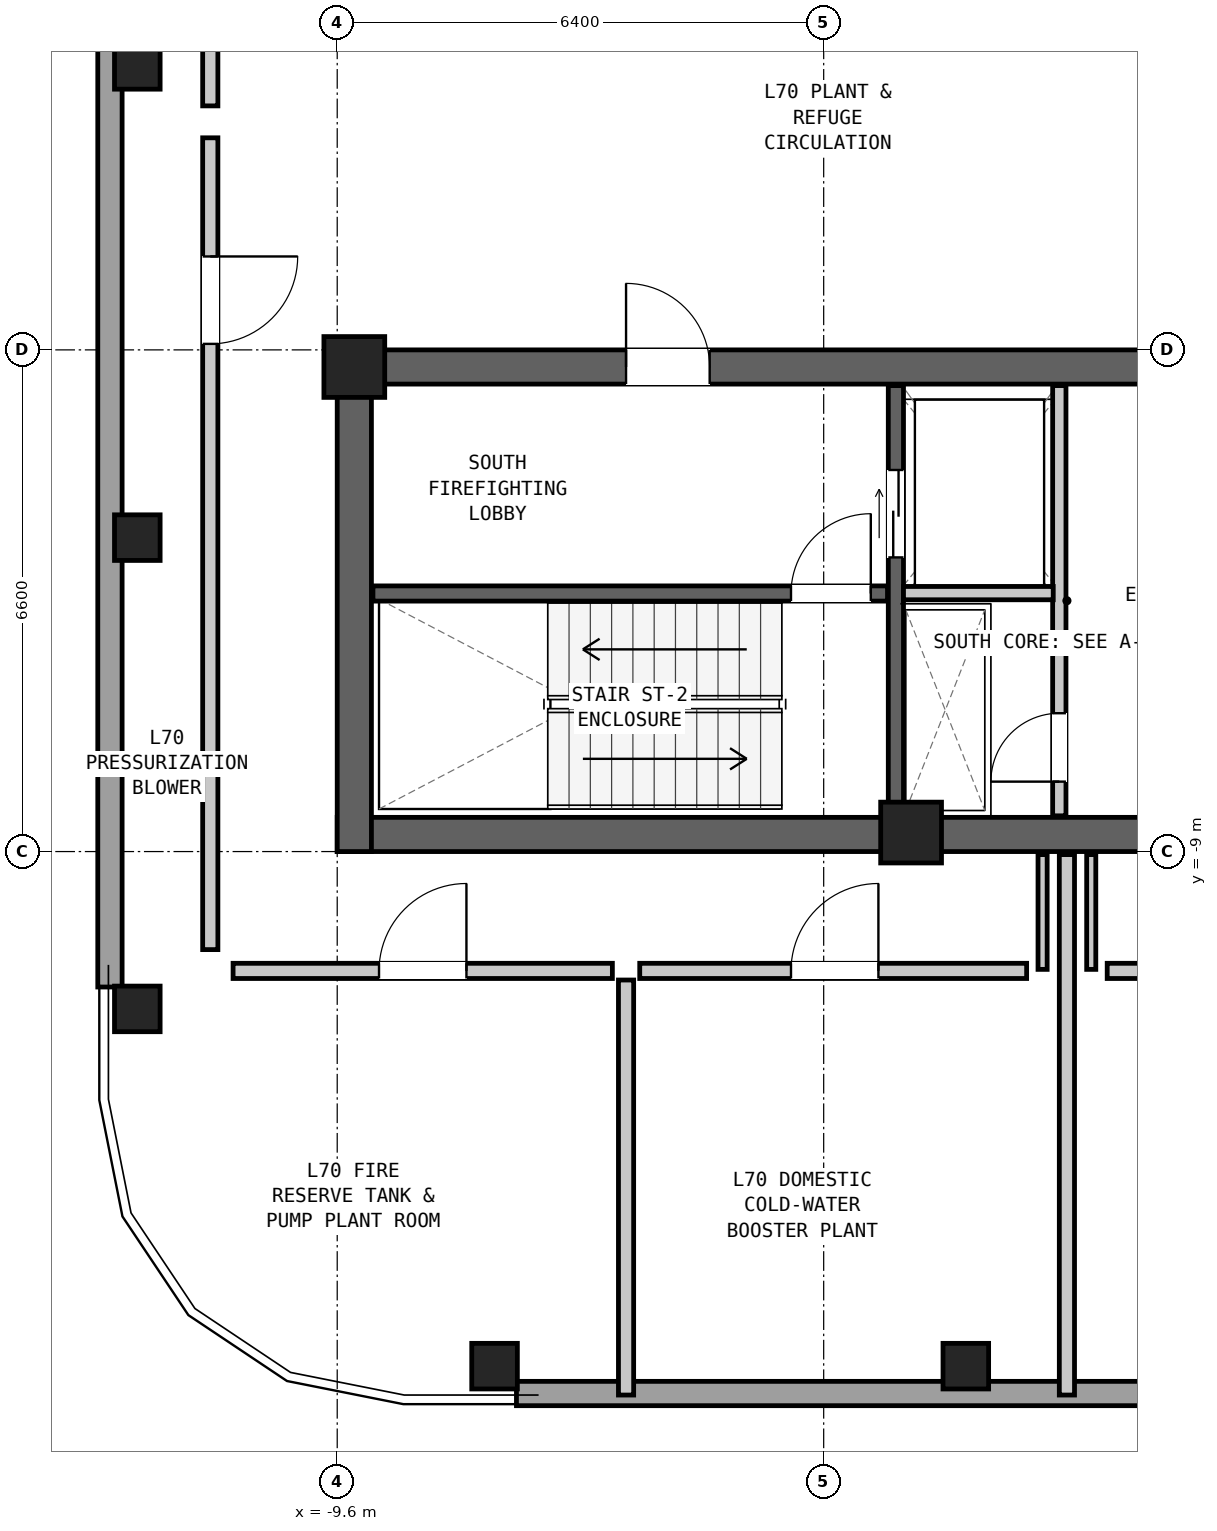
"""IFC4 building model, lengths in metres.
Left out: names, types, materials, properties, quantities, classifications, styles, units other than length and angle.
Written with IfcOpenShell. Run it as: python <this file> out.ifc"""

import sys

from ifc_helpers import new_model, si_unit, direction, frame, frame_2d, origin, origin_2d, place, context, subcontext, project, spatial, rectangle, hollow_rectangle, extrude, element, fill, save


model = new_model("IFC4")
c1 = context("Model", 3, precision=1e-05, world=origin(), true_north=direction((0.0, 1.0)))
c2 = subcontext(c1, "Body", "Model", "MODEL_VIEW")
j1 = project(units=[si_unit("LENGTHUNIT", "METRE"), si_unit("PLANEANGLEUNIT", "RADIAN")], contexts=[c1])
p1 = place(None, origin())
s1 = spatial("IfcSite", under=j1, at=p1, CompositionType="ELEMENT")
p2 = place(p1, origin())
s2 = spatial("IfcBuilding", under=s1, at=p2, CompositionType="ELEMENT")
p3 = place(p2, frame((0.0, 0.0, 238.5)))
s3 = spatial("IfcBuildingStorey", under=s2, at=p3, CompositionType="ELEMENT", Elevation=238.5)
p4 = place(p3, frame((-9.6, -8.775, 0.0), z_axis=(0.0, 0.0, 1.0), x_axis=(1.0, 0.0, 0.0)))
e1 = element("IfcWall", 1, at=p4, inside=s3, PredefinedType="SHEAR", context=c2, shape_type="SweptSolid", body=[
    extrude(rectangle(XDim=19.2, YDim=0.45, at=frame_2d((9.6, 0.0))), origin(), (0.0, 0.0, 1.0), 4.35),
])
p5 = place(p3, frame((-9.6, -2.625, 0.0), z_axis=(0.0, 0.0, 1.0), x_axis=(1.0, 0.0, 0.0)))
e2 = element("IfcWall", 2, at=p5, inside=s3, PredefinedType="SHEAR", context=c2, shape_type="SweptSolid", body=[
    extrude(rectangle(XDim=19.2, YDim=0.45, at=frame_2d((9.6, 0.0))), origin(), (0.0, 0.0, 1.0), 4.35),
])
p6 = place(p5, frame((3.8, 0.0, 0.0)))
e3 = element("IfcOpeningElement", 3, at=p6, cuts=e2, PredefinedType="OPENING", context=c2, shape_type="SweptSolid", body=[
    extrude(rectangle(XDim=1.1, YDim=2.08, at=frame_2d((0.55, 1.04))), frame((0.0, 0.237, 0.0), z_axis=(0.0, -1.0, 0.0), x_axis=(1.0, 0.0, 0.0)), (0.0, 0.0, 1.0), 0.474),
])
p7 = place(p5, frame((10.8, 0.0, 0.0)))
e4 = element("IfcOpeningElement", 4, at=p7, cuts=e2, PredefinedType="OPENING", context=c2, shape_type="SweptSolid", body=[
    extrude(rectangle(XDim=0.95, YDim=2.1, at=frame_2d((0.475, 1.05))), frame((0.0, 0.237, 0.0), z_axis=(0.0, -1.0, 0.0), x_axis=(1.0, 0.0, 0.0)), (0.0, 0.0, 1.0), 0.474),
])
p8 = place(p5, frame((14.8, 0.0, 0.0)))
e5 = element("IfcOpeningElement", 5, at=p8, cuts=e2, PredefinedType="OPENING", context=c2, shape_type="SweptSolid", body=[
    extrude(rectangle(XDim=1.6, YDim=2.12, at=frame_2d((0.8, 1.06))), frame((0.0, 0.237, 0.0), z_axis=(0.0, -1.0, 0.0), x_axis=(1.0, 0.0, 0.0)), (0.0, 0.0, 1.0), 0.474),
])
p9 = place(p3, frame((-9.375, -9.0, 0.0), z_axis=(0.0, 0.0, 1.0), x_axis=(0.0, 1.0, 0.0)))
e6 = element("IfcWall", 6, at=p9, inside=s3, PredefinedType="SHEAR", context=c2, shape_type="SweptSolid", body=[
    extrude(rectangle(XDim=6.6, YDim=0.45, at=frame_2d((3.3, 0.0))), origin(), (0.0, 0.0, 1.0), 4.35),
])
for number, where, z_axis, x_axis in (
    (7, (-7.53, -15.77, 0.0), (0.0, 0.0, 1.0), (1.0, 0.0, 0.0)),
    (8, (-1.33, -15.77, 0.0), (0.0, 0.0, 1.0), (1.0, 0.0, 0.0)),
    (9, (-12.23, 1.33, 0.0), (0.0, 0.0, 1.0), (0.0, 1.0, 0.0)),
    (10, (-12.23, -4.87, 0.0), (0.0, 0.0, 1.0), (0.0, 1.0, 0.0)),
    (11, (-12.23, -11.07, 0.0), (0.0, 0.0, 1.0), (0.0, 1.0, 0.0)),
):
    element("IfcColumn", number, at=place(p3, frame(where, z_axis=z_axis, x_axis=x_axis)), inside=s3, PredefinedType="COLUMN", context=c2, shape_type="SweptSolid", body=[
        extrude(hollow_rectangle(XDim=0.6, YDim=0.6, WallThickness=0.04, at=origin_2d()), origin(), (0.0, 0.0, 1.0), 4.35),
    ])
for number, where, z_axis, x_axis in (
    (12, (-9.375, -2.625, 0.0), (0.0, 0.0, 1.0), (1.0, 0.0, 0.0)),
    (13, (-2.05, -8.75, 0.0), (0.0, 0.0, 1.0), (1.0, 0.0, 0.0)),
):
    element("IfcColumn", number, at=place(p3, frame(where, z_axis=z_axis, x_axis=x_axis)), inside=s3, PredefinedType="COLUMN", context=c2, shape_type="SweptSolid", body=[
        extrude(rectangle(XDim=0.8, YDim=0.8, at=origin_2d()), origin(), (0.0, 0.0, 1.0), 4.35),
    ])
for number, where, z_axis, x_axis in (
    (14, (10.782, -16.13, 0.0), (0.0, 0.0, 1.0), (-1.0, 0.0, 0.0)),
    (15, (-12.59, -10.782, 0.0), (0.0, 0.0, 1.0), (0.0, 1.0, 0.0)),
):
    element("IfcWall", number, at=place(p3, frame(where, z_axis=z_axis, x_axis=x_axis)), inside=s3, PredefinedType="SOLIDWALL", context=c2, shape_type="SweptSolid", body=[
        extrude(rectangle(XDim=18.024, YDim=0.32, at=frame_2d((9.012, 0.0))), origin(), (0.0, 0.0, 1.0), 2.34),
    ])
p10 = place(p3, frame((-9.13, -5.605, 0.0), z_axis=(0.0, 0.0, 1.0), x_axis=(1.0, 0.0, 0.0)))
e16 = element("IfcWall", 16, at=p10, inside=s3, PredefinedType="SHEAR", context=c2, shape_type="SweptSolid", body=[
    extrude(rectangle(XDim=6.77, YDim=0.2, at=frame_2d((3.385, 0.0))), origin(), (0.0, 0.0, 1.0), 4.16),
])
p11 = place(p10, frame((5.5, 0.0, 0.0)))
e17 = element("IfcOpeningElement", 17, at=p11, cuts=e16, PredefinedType="OPENING", context=c2, shape_type="SweptSolid", body=[
    extrude(rectangle(XDim=1.05, YDim=2.08, at=frame_2d((0.525, 1.04))), frame((0.0, 0.112, 0.0), z_axis=(0.0, -1.0, 0.0), x_axis=(1.0, 0.0, 0.0)), (0.0, 0.0, 1.0), 0.224),
])
p12 = place(p3, frame((-2.25, -8.53, 0.0), z_axis=(0.0, 0.0, 1.0), x_axis=(0.0, 1.0, 0.0)))
e18 = element("IfcWall", 18, at=p12, inside=s3, PredefinedType="SHEAR", context=c2, shape_type="SweptSolid", body=[
    extrude(rectangle(XDim=5.66, YDim=0.2, at=frame_2d((2.83, 0.0))), origin(), (0.0, 0.0, 1.0), 4.16),
])
p13 = place(p12, frame((3.4, 0.0, 0.0)))
e19 = element("IfcOpeningElement", 19, at=p13, cuts=e18, PredefinedType="OPENING", context=c2, shape_type="SweptSolid", body=[
    extrude(rectangle(XDim=1.15, YDim=2.08, at=frame_2d((0.575, 1.04))), frame((0.0, 0.112, 0.0), z_axis=(0.0, -1.0, 0.0), x_axis=(1.0, 0.0, 0.0)), (0.0, 0.0, 1.0), 0.224),
])
p14 = place(p3, frame((-0.1, -8.53, 0.0), z_axis=(0.0, 0.0, 1.0), x_axis=(0.0, 1.0, 0.0)))
e20 = element("IfcWall", 20, at=p14, inside=s3, PredefinedType="PARTITIONING", context=c2, shape_type="SweptSolid", body=[
    extrude(rectangle(XDim=5.66, YDim=0.175, at=frame_2d((2.83, 0.0))), origin(), (0.0, 0.0, 1.0), 2.34),
])
p15 = place(p14, frame((0.45, 0.0, 0.0)))
e21 = element("IfcOpeningElement", 21, at=p15, cuts=e20, PredefinedType="OPENING", context=c2, shape_type="SweptSolid", body=[
    extrude(rectangle(XDim=0.9, YDim=2.05, at=frame_2d((0.45, 1.025))), frame((0.0, 0.1, 0.0), z_axis=(0.0, -1.0, 0.0), x_axis=(1.0, 0.0, 0.0)), (0.0, 0.0, 1.0), 0.199),
])
p16 = place(p3, frame((-2.15, -5.6, 0.0), z_axis=(0.0, 0.0, 1.0), x_axis=(1.0, 0.0, 0.0)))
e22 = element("IfcWall", 22, at=p16, inside=s3, PredefinedType="PARTITIONING", context=c2, shape_type="SweptSolid", body=[
    extrude(rectangle(XDim=1.97, YDim=0.175, at=frame_2d((0.985, 0.0))), origin(), (0.0, 0.0, 1.0), 4.16),
])
p17 = place(p3, frame((0.0, -16.15, 0.0), z_axis=(0.0, 0.0, 1.0), x_axis=(0.0, 1.0, 0.0)))
e23 = element("IfcWall", 23, at=p17, inside=s3, PredefinedType="PARTITIONING", context=c2, shape_type="SweptSolid", body=[
    extrude(rectangle(XDim=7.11, YDim=0.2, at=frame_2d((3.555, 0.0))), origin(), (0.0, 0.0, 1.0), 2.34),
])
p18 = place(p3, frame((-0.32, -10.55, 0.0), z_axis=(0.0, 0.0, 1.0), x_axis=(0.0, 1.0, 0.0)))
e24 = element("IfcWall", 24, at=p18, inside=s3, PredefinedType="PARTITIONING", context=c2, shape_type="SweptSolid", body=[
    extrude(rectangle(XDim=1.51, YDim=0.12, at=frame_2d((0.755, 0.0))), origin(), (0.0, 0.0, 1.0), 2.34),
])
p19 = place(p3, frame((0.32, -10.55, 0.0), z_axis=(0.0, 0.0, 1.0), x_axis=(0.0, 1.0, 0.0)))
e25 = element("IfcWall", 25, at=p19, inside=s3, PredefinedType="PARTITIONING", context=c2, shape_type="SweptSolid", body=[
    extrude(rectangle(XDim=1.51, YDim=0.12, at=frame_2d((0.755, 0.0))), origin(), (0.0, 0.0, 1.0), 4.16),
])
p20 = place(p3, frame((-10.97, -10.57, 0.0), z_axis=(0.0, 0.0, 1.0), x_axis=(1.0, 0.0, 0.0)))
e26 = element("IfcWall", 26, at=p20, inside=s3, PredefinedType="PARTITIONING", context=c2, shape_type="SweptSolid", body=[
    extrude(rectangle(XDim=4.99, YDim=0.2, at=frame_2d((2.495, 0.0))), origin(), (0.0, 0.0, 1.0), 4.16),
])
p21 = place(p20, frame((1.92, 0.0, 0.0)))
e27 = element("IfcOpeningElement", 27, at=p21, cuts=e26, PredefinedType="OPENING", context=c2, shape_type="SweptSolid", body=[
    extrude(rectangle(XDim=1.15, YDim=2.1, at=frame_2d((0.575, 1.05))), frame((0.0, 0.112, 0.0), z_axis=(0.0, -1.0, 0.0), x_axis=(1.0, 0.0, 0.0)), (0.0, 0.0, 1.0), 0.224),
])
p22 = place(p3, frame((-5.8, -16.15, 0.0), z_axis=(0.0, 0.0, 1.0), x_axis=(0.0, 1.0, 0.0)))
e28 = element("IfcWall", 28, at=p22, inside=s3, PredefinedType="PARTITIONING", context=c2, shape_type="SweptSolid", body=[
    extrude(rectangle(XDim=5.46, YDim=0.2, at=frame_2d((2.73, 0.0))), origin(), (0.0, 0.0, 1.0), 3.681),
])
p23 = place(p3, frame((-5.62, -10.57, 0.0), z_axis=(0.0, 0.0, 1.0), x_axis=(1.0, 0.0, 0.0)))
e29 = element("IfcWall", 29, at=p23, inside=s3, PredefinedType="PARTITIONING", context=c2, shape_type="SweptSolid", body=[
    extrude(rectangle(XDim=5.09, YDim=0.2, at=frame_2d((2.545, 0.0))), origin(), (0.0, 0.0, 1.0), 4.16),
])
p24 = place(p23, frame((1.99, 0.0, 0.0)))
e30 = element("IfcOpeningElement", 30, at=p24, cuts=e29, PredefinedType="OPENING", context=c2, shape_type="SweptSolid", body=[
    extrude(rectangle(XDim=1.15, YDim=2.1, at=frame_2d((0.575, 1.05))), frame((0.0, 0.112, 0.0), z_axis=(0.0, -1.0, 0.0), x_axis=(1.0, 0.0, 0.0)), (0.0, 0.0, 1.0), 0.224),
])
p25 = place(p3, frame((0.53, -10.57, 0.0), z_axis=(0.0, 0.0, 1.0), x_axis=(1.0, 0.0, 0.0)))
e31 = element("IfcWall", 31, at=p25, inside=s3, PredefinedType="PARTITIONING", context=c2, shape_type="SweptSolid", body=[
    extrude(rectangle(XDim=5.09, YDim=0.2, at=frame_2d((2.545, 0.0))), origin(), (0.0, 0.0, 1.0), 4.16),
])
p26 = place(p25, frame((1.97, 0.0, 0.0)))
e32 = element("IfcOpeningElement", 32, at=p26, cuts=e31, PredefinedType="OPENING", context=c2, shape_type="SweptSolid", body=[
    extrude(rectangle(XDim=1.15, YDim=2.1, at=frame_2d((0.575, 1.05))), frame((0.0, 0.112, 0.0), z_axis=(0.0, -1.0, 0.0), x_axis=(1.0, 0.0, 0.0)), (0.0, 0.0, 1.0), 0.224),
])
p27 = place(p3, frame((-11.27, 0.39, 0.0), z_axis=(0.0, 0.0, 1.0), x_axis=(0.0, -1.0, 0.0)))
e33 = element("IfcWall", 33, at=p27, inside=s3, PredefinedType="PARTITIONING", context=c2, shape_type="SweptSolid", body=[
    extrude(rectangle(XDim=10.68, YDim=0.2, at=frame_2d((5.34, 0.0))), origin(), (0.0, 0.0, 1.0), 4.16),
])
p28 = place(p27, frame((1.561, 0.0, 0.0)))
e34 = element("IfcOpeningElement", 34, at=p28, cuts=e33, PredefinedType="OPENING", context=c2, shape_type="SweptSolid", body=[
    extrude(rectangle(XDim=1.15, YDim=2.1, at=frame_2d((0.575, 1.05))), frame((0.0, 0.112, 0.0), z_axis=(0.0, -1.0, 0.0), x_axis=(1.0, 0.0, 0.0)), (0.0, 0.0, 1.0), 0.224),
])
p29 = place(p3, frame((-11.27, 11.55, 0.0), z_axis=(0.0, 0.0, 1.0), x_axis=(0.0, -1.0, 0.0)))
e35 = element("IfcWall", 35, at=p29, inside=s3, PredefinedType="PARTITIONING", context=c2, shape_type="SweptSolid", body=[
    extrude(rectangle(XDim=10.74, YDim=0.2, at=frame_2d((5.37, 0.0))), origin(), (0.0, 0.0, 1.0), 4.16),
])
p30 = place(p29, frame((4.795, 0.0, 0.0)))
e36 = element("IfcOpeningElement", 36, at=p30, cuts=e35, PredefinedType="OPENING", context=c2, shape_type="SweptSolid", body=[
    extrude(rectangle(XDim=1.15, YDim=2.1, at=frame_2d((0.575, 1.05))), frame((0.0, 0.112, 0.0), z_axis=(0.0, -1.0, 0.0), x_axis=(1.0, 0.0, 0.0)), (0.0, 0.0, 1.0), 0.224),
])
p31 = place(p11, origin())
e37 = element("IfcDoor", 37, at=p31, inside=s3, OperationType="SINGLE_SWING_RIGHT", PredefinedType="DOOR", context=c2, shape_type="SweptSolid", body=[
    extrude(rectangle(XDim=1.05, YDim=2.08, at=frame_2d((0.525, 1.04))), frame((0.0, 0.025, 0.0), z_axis=(0.0, -1.0, 0.0), x_axis=(1.0, 0.0, 0.0)), (0.0, 0.0, 1.0), 0.05),
])
fill(e17, e37)
p32 = place(p6, origin())
e38 = element("IfcDoor", 38, at=p32, inside=s3, OperationType="SINGLE_SWING_LEFT", PredefinedType="DOOR", context=c2, shape_type="SweptSolid", body=[
    extrude(rectangle(XDim=1.1, YDim=2.08, at=frame_2d((0.55, 1.04))), frame((0.0, 0.025, 0.0), z_axis=(0.0, -1.0, 0.0), x_axis=(1.0, 0.0, 0.0)), (0.0, 0.0, 1.0), 0.05),
])
fill(e3, e38)
p33 = place(p13, origin())
e39 = element("IfcDoor", 39, at=p33, inside=s3, OperationType="DOUBLE_DOOR_SLIDING", PredefinedType="DOOR", context=c2, shape_type="SweptSolid", body=[
    extrude(rectangle(XDim=1.15, YDim=2.08, at=frame_2d((0.575, 1.04))), frame((0.0, 0.025, 0.0), z_axis=(0.0, -1.0, 0.0), x_axis=(1.0, 0.0, 0.0)), (0.0, 0.0, 1.0), 0.05),
])
fill(e19, e39)
p34 = place(p15, origin())
e40 = element("IfcDoor", 40, at=p34, inside=s3, OperationType="SINGLE_SWING_LEFT", PredefinedType="DOOR", context=c2, shape_type="SweptSolid", body=[
    extrude(rectangle(XDim=0.9, YDim=2.05, at=frame_2d((0.45, 1.025))), frame((0.0, 0.025, 0.0), z_axis=(0.0, -1.0, 0.0), x_axis=(1.0, 0.0, 0.0)), (0.0, 0.0, 1.0), 0.05),
])
fill(e21, e40)
p35 = place(p21, origin())
e41 = element("IfcDoor", 41, at=p35, inside=s3, OperationType="SINGLE_SWING_RIGHT", PredefinedType="DOOR", context=c2, shape_type="SweptSolid", body=[
    extrude(rectangle(XDim=1.15, YDim=2.1, at=frame_2d((0.575, 1.05))), frame((0.0, 0.025, 0.0), z_axis=(0.0, -1.0, 0.0), x_axis=(1.0, 0.0, 0.0)), (0.0, 0.0, 1.0), 0.05),
])
fill(e27, e41)
p36 = place(p24, origin())
e42 = element("IfcDoor", 42, at=p36, inside=s3, OperationType="SINGLE_SWING_RIGHT", PredefinedType="DOOR", context=c2, shape_type="SweptSolid", body=[
    extrude(rectangle(XDim=1.15, YDim=2.1, at=frame_2d((0.575, 1.05))), frame((0.0, 0.025, 0.0), z_axis=(0.0, -1.0, 0.0), x_axis=(1.0, 0.0, 0.0)), (0.0, 0.0, 1.0), 0.05),
])
fill(e30, e42)
p37 = place(p28, origin())
e43 = element("IfcDoor", 43, at=p37, inside=s3, OperationType="SINGLE_SWING_LEFT", PredefinedType="DOOR", context=c2, shape_type="SweptSolid", body=[
    extrude(rectangle(XDim=1.15, YDim=2.1, at=frame_2d((0.575, 1.05))), frame((0.0, 0.025, 0.0), z_axis=(0.0, -1.0, 0.0), x_axis=(1.0, 0.0, 0.0)), (0.0, 0.0, 1.0), 0.05),
])
fill(e34, e43)
save(model, sys.argv[1])
